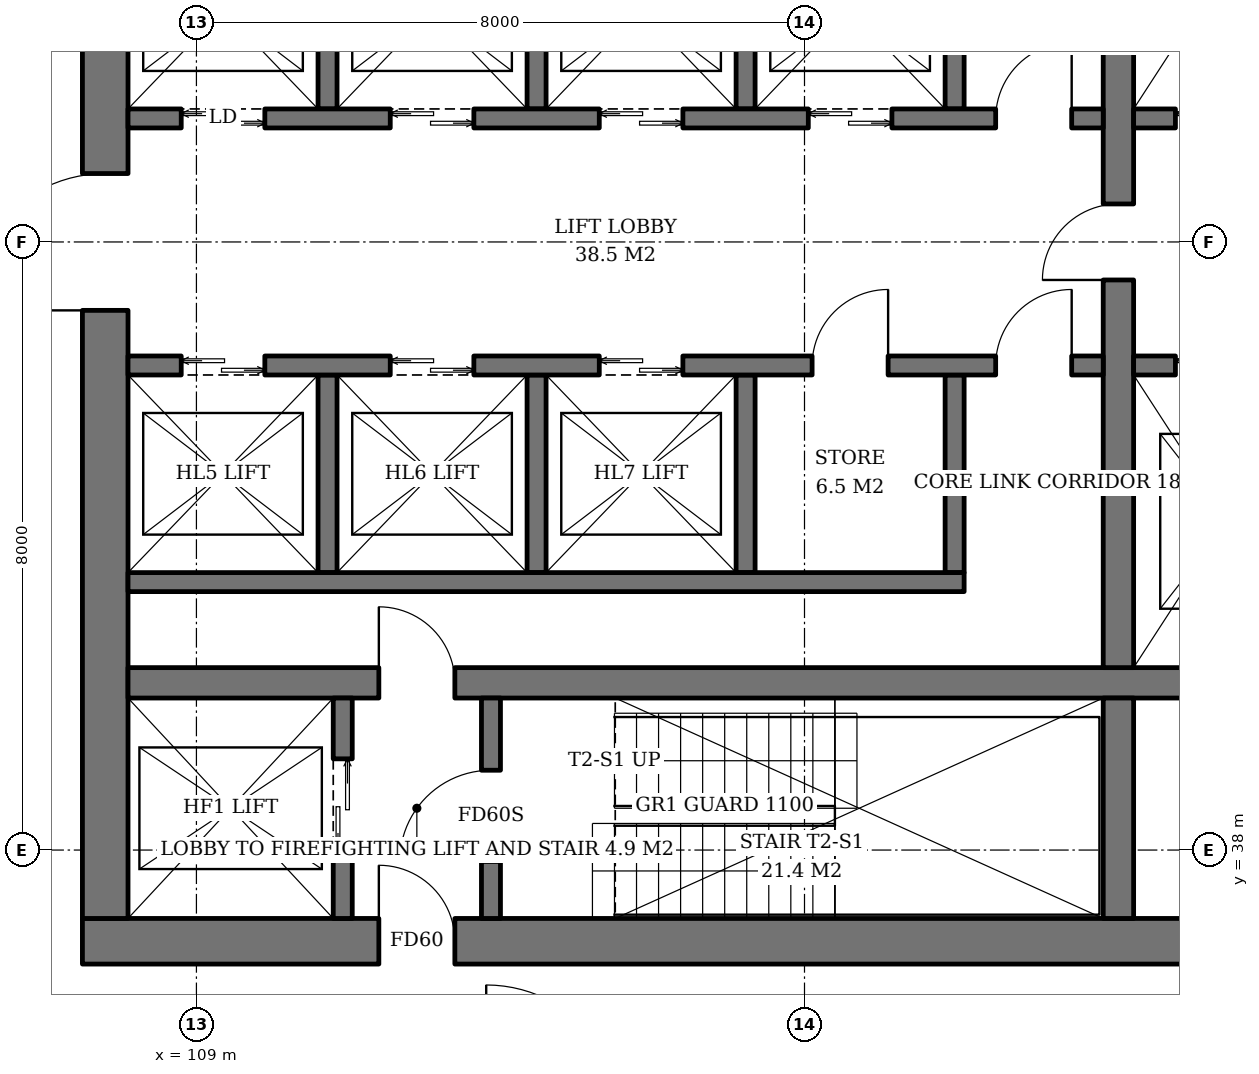
"""IFC4 building model, lengths in metres.
Left out: names, types, materials, properties, quantities, classifications, styles, units other than length and angle.
Written with IfcOpenShell. Run it as: python <this file> out.ifc"""

import sys

from ifc_helpers import new_model, si_unit, direction, frame, frame_2d, origin, place, context, subcontext, project, spatial, rectangle, extrude, element, fill, save


model = new_model("IFC4")
c1 = context("Model", 3, precision=1e-05, world=origin(), true_north=direction((0.0, 1.0)))
c2 = subcontext(c1, "Body", "Model", "MODEL_VIEW")
j1 = project(units=[si_unit("LENGTHUNIT", "METRE"), si_unit("PLANEANGLEUNIT", "RADIAN")], contexts=[c1])
p1 = place(None, origin())
s1 = spatial("IfcSite", under=j1, at=p1, CompositionType="ELEMENT")
p2 = place(p1, origin())
s2 = spatial("IfcBuilding", under=s1, at=p2, CompositionType="ELEMENT")
p3 = place(p2, frame((0.0, 0.0, 81.8)))
s3 = spatial("IfcBuildingStorey", under=s2, at=p3, CompositionType="ELEMENT", Elevation=81.8)
p4 = place(p3, frame((107.5, 36.8, 0.0), z_axis=(0.0, 0.0, 1.0), x_axis=(1.0, 0.0, 0.0)))
e1 = element("IfcWall", 1, at=p4, inside=s3, PredefinedType="SHEAR", context=c2, shape_type="SweptSolid", body=[
    extrude(rectangle(XDim=19.0, YDim=0.6, at=frame_2d((9.5, 0.0))), origin(), (0.0, 0.0, 1.0), 3.8),
])
p5 = place(p4, frame((3.9, 0.0, 0.0)))
e2 = element("IfcOpeningElement", 2, at=p5, cuts=e1, PredefinedType="OPENING", context=c2, shape_type="SweptSolid", body=[
    extrude(rectangle(XDim=1.0, YDim=2.1, at=frame_2d((0.5, 1.05))), frame((0.0, 0.31, 0.0), z_axis=(0.0, -1.0, 0.0), x_axis=(1.0, 0.0, 0.0)), (0.0, 0.0, 1.0), 0.62),
])
p6 = place(p4, frame((15.615, 0.0, 0.0)))
e3 = element("IfcOpeningElement", 3, at=p6, cuts=e1, PredefinedType="OPENING", context=c2, shape_type="SweptSolid", body=[
    extrude(rectangle(XDim=1.0, YDim=2.1, at=frame_2d((0.5, 1.05))), frame((0.0, 0.31, 0.0), z_axis=(0.0, -1.0, 0.0), x_axis=(1.0, 0.0, 0.0)), (0.0, 0.0, 1.0), 0.62),
])
p7 = place(p3, frame((107.8, 37.1, 0.0), z_axis=(0.0, 0.0, 1.0), x_axis=(0.0, 1.0, 0.0)))
e4 = element("IfcWall", 4, at=p7, inside=s3, PredefinedType="SHEAR", context=c2, shape_type="SweptSolid", body=[
    extrude(rectangle(XDim=17.8, YDim=0.6, at=frame_2d((8.9, 0.0))), origin(), (0.0, 0.0, 1.0), 3.8),
])
p8 = place(p7, frame((8.0, 0.0, 0.0)))
e5 = element("IfcOpeningElement", 5, at=p8, cuts=e4, PredefinedType="OPENING", context=c2, shape_type="SweptSolid", body=[
    extrude(rectangle(XDim=1.8, YDim=2.4, at=frame_2d((0.9, 1.2))), frame((0.0, 0.31, 0.0), z_axis=(0.0, -1.0, 0.0), x_axis=(1.0, 0.0, 0.0)), (0.0, 0.0, 1.0), 0.62),
])
p9 = place(p3, frame((108.1, 40.2, 0.0), z_axis=(0.0, 0.0, 1.0), x_axis=(1.0, 0.0, 0.0)))
e6 = element("IfcWall", 6, at=p9, inside=s3, PredefinedType="SHEAR", context=c2, shape_type="SweptSolid", body=[
    extrude(rectangle(XDim=17.8, YDim=0.4, at=frame_2d((8.9, 0.0))), origin(), (0.0, 0.0, 1.0), 3.8),
])
p10 = place(p9, frame((3.3, 0.0, 0.0)))
e7 = element("IfcOpeningElement", 7, at=p10, cuts=e6, PredefinedType="OPENING", context=c2, shape_type="SweptSolid", body=[
    extrude(rectangle(XDim=1.0, YDim=2.1, at=frame_2d((0.5, 1.05))), frame((0.0, 0.21, 0.0), z_axis=(0.0, -1.0, 0.0), x_axis=(1.0, 0.0, 0.0)), (0.0, 0.0, 1.0), 0.42),
])
p11 = place(p3, frame((121.13, 37.1, 0.0), z_axis=(0.0, 0.0, 1.0), x_axis=(0.0, 1.0, 0.0)))
e8 = element("IfcWall", 8, at=p11, inside=s3, PredefinedType="SHEAR", context=c2, shape_type="SweptSolid", body=[
    extrude(rectangle(XDim=2.9, YDim=0.4, at=frame_2d((1.45, 0.0))), origin(), (0.0, 0.0, 1.0), 3.8),
])
p12 = place(p3, frame((121.13, 40.4, 0.0), z_axis=(0.0, 0.0, 1.0), x_axis=(0.0, 1.0, 0.0)))
e9 = element("IfcWall", 9, at=p12, inside=s3, PredefinedType="SHEAR", context=c2, shape_type="SweptSolid", body=[
    extrude(rectangle(XDim=11.2, YDim=0.4, at=frame_2d((5.6, 0.0))), origin(), (0.0, 0.0, 1.0), 3.8),
])
p13 = place(p12, frame((5.1, 0.0, 0.0)))
e10 = element("IfcOpeningElement", 10, at=p13, cuts=e9, PredefinedType="OPENING", context=c2, shape_type="SweptSolid", body=[
    extrude(rectangle(XDim=1.0, YDim=2.1, at=frame_2d((0.5, 1.05))), frame((0.0, 0.21, 0.0), z_axis=(0.0, -1.0, 0.0), x_axis=(1.0, 0.0, 0.0)), (0.0, 0.0, 1.0), 0.42),
])
p14 = place(p3, frame((110.925, 37.1, 0.0), z_axis=(0.0, 0.0, 1.0), x_axis=(0.0, 1.0, 0.0)))
e11 = element("IfcWall", 11, at=p14, inside=s3, PredefinedType="SHEAR", context=c2, shape_type="SweptSolid", body=[
    extrude(rectangle(XDim=2.9, YDim=0.25, at=frame_2d((1.45, 0.0))), origin(), (0.0, 0.0, 1.0), 3.8),
])
p15 = place(p14, frame((0.8, 0.0, 0.0)))
e12 = element("IfcOpeningElement", 12, at=p15, cuts=e11, PredefinedType="OPENING", context=c2, shape_type="SweptSolid", body=[
    extrude(rectangle(XDim=1.3, YDim=2.2, at=frame_2d((0.65, 1.1))), frame((0.0, 0.135, 0.0), z_axis=(0.0, -1.0, 0.0), x_axis=(1.0, 0.0, 0.0)), (0.0, 0.0, 1.0), 0.27),
])
p16 = place(p3, frame((112.875, 37.1, 0.0), z_axis=(0.0, 0.0, 1.0), x_axis=(0.0, 1.0, 0.0)))
e13 = element("IfcWall", 13, at=p16, inside=s3, PredefinedType="SHEAR", context=c2, shape_type="SweptSolid", body=[
    extrude(rectangle(XDim=2.9, YDim=0.25, at=frame_2d((1.45, 0.0))), origin(), (0.0, 0.0, 1.0), 3.8),
])
p17 = place(p16, frame((0.75, 0.0, 0.0)))
e14 = element("IfcOpeningElement", 14, at=p17, cuts=e13, PredefinedType="OPENING", context=c2, shape_type="SweptSolid", body=[
    extrude(rectangle(XDim=1.2, YDim=2.1, at=frame_2d((0.6, 1.05))), frame((0.0, 0.135, 0.0), z_axis=(0.0, -1.0, 0.0), x_axis=(1.0, 0.0, 0.0)), (0.0, 0.0, 1.0), 0.27),
])
for number, where, z_axis, x_axis in (
    (15, (110.725, 47.75, 0.0), (0.0, 0.0, 1.0), (0.0, 1.0, 0.0)),
    (16, (113.475, 47.75, 0.0), (0.0, 0.0, 1.0), (0.0, 1.0, 0.0)),
    (17, (116.225, 47.75, 0.0), (0.0, 0.0, 1.0), (0.0, 1.0, 0.0)),
    (18, (118.975, 47.75, 0.0), (0.0, 0.0, 1.0), (0.0, 1.0, 0.0)),
):
    element("IfcWall", number, at=place(p3, frame(where, z_axis=z_axis, x_axis=x_axis)), inside=s3, PredefinedType="SHEAR", context=c2, shape_type="SweptSolid", body=[
        extrude(rectangle(XDim=2.6, YDim=0.25, at=frame_2d((1.3, 0.0))), origin(), (0.0, 0.0, 1.0), 3.8),
    ])
p18 = place(p3, frame((108.1, 47.625, 0.0), z_axis=(0.0, 0.0, 1.0), x_axis=(1.0, 0.0, 0.0)))
e19 = element("IfcWall", 19, at=p18, inside=s3, PredefinedType="SHEAR", context=c2, shape_type="SweptSolid", body=[
    extrude(rectangle(XDim=12.83, YDim=0.25, at=frame_2d((6.415, 0.0))), origin(), (0.0, 0.0, 1.0), 3.8),
])
p19 = place(p18, frame((0.7, 0.0, 0.0)))
e20 = element("IfcOpeningElement", 20, at=p19, cuts=e19, PredefinedType="OPENING", context=c2, shape_type="SweptSolid", body=[
    extrude(rectangle(XDim=1.1, YDim=2.2, at=frame_2d((0.55, 1.1))), frame((0.0, 0.135, 0.0), z_axis=(0.0, -1.0, 0.0), x_axis=(1.0, 0.0, 0.0)), (0.0, 0.0, 1.0), 0.27),
])
p20 = place(p18, frame((3.45, 0.0, 0.0)))
e21 = element("IfcOpeningElement", 21, at=p20, cuts=e19, PredefinedType="OPENING", context=c2, shape_type="SweptSolid", body=[
    extrude(rectangle(XDim=1.1, YDim=2.2, at=frame_2d((0.55, 1.1))), frame((0.0, 0.135, 0.0), z_axis=(0.0, -1.0, 0.0), x_axis=(1.0, 0.0, 0.0)), (0.0, 0.0, 1.0), 0.27),
])
p21 = place(p18, frame((6.2, 0.0, 0.0)))
e22 = element("IfcOpeningElement", 22, at=p21, cuts=e19, PredefinedType="OPENING", context=c2, shape_type="SweptSolid", body=[
    extrude(rectangle(XDim=1.1, YDim=2.2, at=frame_2d((0.55, 1.1))), frame((0.0, 0.135, 0.0), z_axis=(0.0, -1.0, 0.0), x_axis=(1.0, 0.0, 0.0)), (0.0, 0.0, 1.0), 0.27),
])
p22 = place(p18, frame((8.95, 0.0, 0.0)))
e23 = element("IfcOpeningElement", 23, at=p22, cuts=e19, PredefinedType="OPENING", context=c2, shape_type="SweptSolid", body=[
    extrude(rectangle(XDim=1.1, YDim=2.2, at=frame_2d((0.55, 1.1))), frame((0.0, 0.135, 0.0), z_axis=(0.0, -1.0, 0.0), x_axis=(1.0, 0.0, 0.0)), (0.0, 0.0, 1.0), 0.27),
])
p23 = place(p18, frame((11.415, 0.0, 0.0)))
e24 = element("IfcOpeningElement", 24, at=p23, cuts=e19, PredefinedType="OPENING", context=c2, shape_type="SweptSolid", body=[
    extrude(rectangle(XDim=1.0, YDim=2.1, at=frame_2d((0.5, 1.05))), frame((0.0, 0.135, 0.0), z_axis=(0.0, -1.0, 0.0), x_axis=(1.0, 0.0, 0.0)), (0.0, 0.0, 1.0), 0.27),
])
for number, where, z_axis, x_axis in (
    (25, (110.725, 44.25, 0.0), (0.0, 0.0, 1.0), (0.0, -1.0, 0.0)),
    (26, (113.475, 44.25, 0.0), (0.0, 0.0, 1.0), (0.0, -1.0, 0.0)),
    (27, (116.225, 44.25, 0.0), (0.0, 0.0, 1.0), (0.0, -1.0, 0.0)),
    (28, (118.975, 44.25, 0.0), (0.0, 0.0, 1.0), (0.0, -1.0, 0.0)),
):
    element("IfcWall", number, at=place(p3, frame(where, z_axis=z_axis, x_axis=x_axis)), inside=s3, PredefinedType="SHEAR", context=c2, shape_type="SweptSolid", body=[
        extrude(rectangle(XDim=2.6, YDim=0.25, at=frame_2d((1.3, 0.0))), origin(), (0.0, 0.0, 1.0), 3.8),
    ])
p24 = place(p3, frame((108.1, 41.525, 0.0), z_axis=(0.0, 0.0, 1.0), x_axis=(1.0, 0.0, 0.0)))
e29 = element("IfcWall", 29, at=p24, inside=s3, PredefinedType="SHEAR", context=c2, shape_type="SweptSolid", body=[
    extrude(rectangle(XDim=11.0, YDim=0.25, at=frame_2d((5.5, 0.0))), origin(), (0.0, 0.0, 1.0), 3.8),
])
p25 = place(p3, frame((108.1, 44.375, 0.0), z_axis=(0.0, 0.0, 1.0), x_axis=(1.0, 0.0, 0.0)))
e30 = element("IfcWall", 30, at=p25, inside=s3, PredefinedType="SHEAR", context=c2, shape_type="SweptSolid", body=[
    extrude(rectangle(XDim=12.83, YDim=0.25, at=frame_2d((6.415, 0.0))), origin(), (0.0, 0.0, 1.0), 3.8),
])
p26 = place(p25, frame((0.7, 0.0, 0.0)))
e31 = element("IfcOpeningElement", 31, at=p26, cuts=e30, PredefinedType="OPENING", context=c2, shape_type="SweptSolid", body=[
    extrude(rectangle(XDim=1.1, YDim=2.2, at=frame_2d((0.55, 1.1))), frame((0.0, 0.135, 0.0), z_axis=(0.0, -1.0, 0.0), x_axis=(1.0, 0.0, 0.0)), (0.0, 0.0, 1.0), 0.27),
])
p27 = place(p25, frame((3.45, 0.0, 0.0)))
e32 = element("IfcOpeningElement", 32, at=p27, cuts=e30, PredefinedType="OPENING", context=c2, shape_type="SweptSolid", body=[
    extrude(rectangle(XDim=1.1, YDim=2.2, at=frame_2d((0.55, 1.1))), frame((0.0, 0.135, 0.0), z_axis=(0.0, -1.0, 0.0), x_axis=(1.0, 0.0, 0.0)), (0.0, 0.0, 1.0), 0.27),
])
p28 = place(p25, frame((6.2, 0.0, 0.0)))
e33 = element("IfcOpeningElement", 33, at=p28, cuts=e30, PredefinedType="OPENING", context=c2, shape_type="SweptSolid", body=[
    extrude(rectangle(XDim=1.1, YDim=2.2, at=frame_2d((0.55, 1.1))), frame((0.0, 0.135, 0.0), z_axis=(0.0, -1.0, 0.0), x_axis=(1.0, 0.0, 0.0)), (0.0, 0.0, 1.0), 0.27),
])
p29 = place(p25, frame((9.0, 0.0, 0.0)))
e34 = element("IfcOpeningElement", 34, at=p29, cuts=e30, PredefinedType="OPENING", context=c2, shape_type="SweptSolid", body=[
    extrude(rectangle(XDim=1.0, YDim=2.1, at=frame_2d((0.5, 1.05))), frame((0.0, 0.135, 0.0), z_axis=(0.0, -1.0, 0.0), x_axis=(1.0, 0.0, 0.0)), (0.0, 0.0, 1.0), 0.27),
])
p30 = place(p25, frame((11.415, 0.0, 0.0)))
e35 = element("IfcOpeningElement", 35, at=p30, cuts=e30, PredefinedType="OPENING", context=c2, shape_type="SweptSolid", body=[
    extrude(rectangle(XDim=1.0, YDim=2.1, at=frame_2d((0.5, 1.05))), frame((0.0, 0.135, 0.0), z_axis=(0.0, -1.0, 0.0), x_axis=(1.0, 0.0, 0.0)), (0.0, 0.0, 1.0), 0.27),
])
p31 = place(p3, frame((121.33, 47.625, 0.0), z_axis=(0.0, 0.0, 1.0), x_axis=(1.0, 0.0, 0.0)))
e36 = element("IfcWall", 36, at=p31, inside=s3, PredefinedType="SHEAR", context=c2, shape_type="SweptSolid", body=[
    extrude(rectangle(XDim=4.57, YDim=0.25, at=frame_2d((2.285, 0.0))), origin(), (0.0, 0.0, 1.0), 3.8),
])
p32 = place(p31, frame((0.55, 0.0, 0.0)))
e37 = element("IfcOpeningElement", 37, at=p32, cuts=e36, PredefinedType="OPENING", context=c2, shape_type="SweptSolid", body=[
    extrude(rectangle(XDim=1.4, YDim=2.4, at=frame_2d((0.7, 1.2))), frame((0.0, 0.135, 0.0), z_axis=(0.0, -1.0, 0.0), x_axis=(1.0, 0.0, 0.0)), (0.0, 0.0, 1.0), 0.27),
])
p33 = place(p31, frame((3.26, 0.0, 0.0)))
e38 = element("IfcOpeningElement", 38, at=p33, cuts=e36, PredefinedType="OPENING", context=c2, shape_type="SweptSolid", body=[
    extrude(rectangle(XDim=0.8, YDim=2.0, at=frame_2d((0.4, 1.0))), frame((0.0, 0.135, 0.0), z_axis=(0.0, -1.0, 0.0), x_axis=(1.0, 0.0, 0.0)), (0.0, 0.0, 1.0), 0.27),
])
p34 = place(p3, frame((121.33, 44.375, 0.0), z_axis=(0.0, 0.0, 1.0), x_axis=(1.0, 0.0, 0.0)))
e39 = element("IfcWall", 39, at=p34, inside=s3, PredefinedType="SHEAR", context=c2, shape_type="SweptSolid", body=[
    extrude(rectangle(XDim=4.57, YDim=0.25, at=frame_2d((2.285, 0.0))), origin(), (0.0, 0.0, 1.0), 3.8),
])
p35 = place(p34, frame((0.55, 0.0, 0.0)))
e40 = element("IfcOpeningElement", 40, at=p35, cuts=e39, PredefinedType="OPENING", context=c2, shape_type="SweptSolid", body=[
    extrude(rectangle(XDim=1.4, YDim=2.4, at=frame_2d((0.7, 1.2))), frame((0.0, 0.135, 0.0), z_axis=(0.0, -1.0, 0.0), x_axis=(1.0, 0.0, 0.0)), (0.0, 0.0, 1.0), 0.27),
])
p36 = place(p34, frame((3.26, 0.0, 0.0)))
e41 = element("IfcOpeningElement", 41, at=p36, cuts=e39, PredefinedType="OPENING", context=c2, shape_type="SweptSolid", body=[
    extrude(rectangle(XDim=0.8, YDim=2.0, at=frame_2d((0.4, 1.0))), frame((0.0, 0.135, 0.0), z_axis=(0.0, -1.0, 0.0), x_axis=(1.0, 0.0, 0.0)), (0.0, 0.0, 1.0), 0.27),
])
p37 = place(p15, origin())
e42 = element("IfcDoor", 42, at=p37, inside=s3, OperationType="DOUBLE_DOOR_SLIDING", PredefinedType="DOOR", context=c2, shape_type="SweptSolid", body=[
    extrude(rectangle(XDim=1.3, YDim=2.2, at=frame_2d((0.65, 1.1))), frame((0.0, 0.025, 0.0), z_axis=(0.0, -1.0, 0.0), x_axis=(1.0, 0.0, 0.0)), (0.0, 0.0, 1.0), 0.05),
])
fill(e12, e42)
p38 = place(p17, origin())
e43 = element("IfcDoor", 43, at=p38, inside=s3, OperationType="SINGLE_SWING_LEFT", PredefinedType="DOOR", context=c2, shape_type="SweptSolid", body=[
    extrude(rectangle(XDim=1.2, YDim=2.1, at=frame_2d((0.6, 1.05))), frame((0.0, 0.025, 0.0), z_axis=(0.0, -1.0, 0.0), x_axis=(1.0, 0.0, 0.0)), (0.0, 0.0, 1.0), 0.05),
])
fill(e14, e43)
p39 = place(p19, origin())
e44 = element("IfcDoor", 44, at=p39, inside=s3, OperationType="DOUBLE_DOOR_SLIDING", PredefinedType="DOOR", context=c2, shape_type="SweptSolid", body=[
    extrude(rectangle(XDim=1.1, YDim=2.2, at=frame_2d((0.55, 1.1))), frame((0.0, 0.025, 0.0), z_axis=(0.0, -1.0, 0.0), x_axis=(1.0, 0.0, 0.0)), (0.0, 0.0, 1.0), 0.05),
])
fill(e20, e44)
p40 = place(p20, origin())
e45 = element("IfcDoor", 45, at=p40, inside=s3, OperationType="DOUBLE_DOOR_SLIDING", PredefinedType="DOOR", context=c2, shape_type="SweptSolid", body=[
    extrude(rectangle(XDim=1.1, YDim=2.2, at=frame_2d((0.55, 1.1))), frame((0.0, 0.025, 0.0), z_axis=(0.0, -1.0, 0.0), x_axis=(1.0, 0.0, 0.0)), (0.0, 0.0, 1.0), 0.05),
])
fill(e21, e45)
p41 = place(p21, origin())
e46 = element("IfcDoor", 46, at=p41, inside=s3, OperationType="DOUBLE_DOOR_SLIDING", PredefinedType="DOOR", context=c2, shape_type="SweptSolid", body=[
    extrude(rectangle(XDim=1.1, YDim=2.2, at=frame_2d((0.55, 1.1))), frame((0.0, 0.025, 0.0), z_axis=(0.0, -1.0, 0.0), x_axis=(1.0, 0.0, 0.0)), (0.0, 0.0, 1.0), 0.05),
])
fill(e22, e46)
p42 = place(p22, origin())
e47 = element("IfcDoor", 47, at=p42, inside=s3, OperationType="DOUBLE_DOOR_SLIDING", PredefinedType="DOOR", context=c2, shape_type="SweptSolid", body=[
    extrude(rectangle(XDim=1.1, YDim=2.2, at=frame_2d((0.55, 1.1))), frame((0.0, 0.025, 0.0), z_axis=(0.0, -1.0, 0.0), x_axis=(1.0, 0.0, 0.0)), (0.0, 0.0, 1.0), 0.05),
])
fill(e23, e47)
p43 = place(p23, origin())
e48 = element("IfcDoor", 48, at=p43, inside=s3, OperationType="SINGLE_SWING_RIGHT", PredefinedType="DOOR", context=c2, shape_type="SweptSolid", body=[
    extrude(rectangle(XDim=1.0, YDim=2.1, at=frame_2d((0.5, 1.05))), frame((0.0, 0.025, 0.0), z_axis=(0.0, -1.0, 0.0), x_axis=(1.0, 0.0, 0.0)), (0.0, 0.0, 1.0), 0.05),
])
fill(e24, e48)
p44 = place(p26, origin())
e49 = element("IfcDoor", 49, at=p44, inside=s3, OperationType="DOUBLE_DOOR_SLIDING", PredefinedType="DOOR", context=c2, shape_type="SweptSolid", body=[
    extrude(rectangle(XDim=1.1, YDim=2.2, at=frame_2d((0.55, 1.1))), frame((0.0, 0.025, 0.0), z_axis=(0.0, -1.0, 0.0), x_axis=(1.0, 0.0, 0.0)), (0.0, 0.0, 1.0), 0.05),
])
fill(e31, e49)
p45 = place(p27, origin())
e50 = element("IfcDoor", 50, at=p45, inside=s3, OperationType="DOUBLE_DOOR_SLIDING", PredefinedType="DOOR", context=c2, shape_type="SweptSolid", body=[
    extrude(rectangle(XDim=1.1, YDim=2.2, at=frame_2d((0.55, 1.1))), frame((0.0, 0.025, 0.0), z_axis=(0.0, -1.0, 0.0), x_axis=(1.0, 0.0, 0.0)), (0.0, 0.0, 1.0), 0.05),
])
fill(e32, e50)
p46 = place(p28, origin())
e51 = element("IfcDoor", 51, at=p46, inside=s3, OperationType="DOUBLE_DOOR_SLIDING", PredefinedType="DOOR", context=c2, shape_type="SweptSolid", body=[
    extrude(rectangle(XDim=1.1, YDim=2.2, at=frame_2d((0.55, 1.1))), frame((0.0, 0.025, 0.0), z_axis=(0.0, -1.0, 0.0), x_axis=(1.0, 0.0, 0.0)), (0.0, 0.0, 1.0), 0.05),
])
fill(e33, e51)
p47 = place(p29, origin())
e52 = element("IfcDoor", 52, at=p47, inside=s3, OperationType="SINGLE_SWING_RIGHT", PredefinedType="DOOR", context=c2, shape_type="SweptSolid", body=[
    extrude(rectangle(XDim=1.0, YDim=2.1, at=frame_2d((0.5, 1.05))), frame((0.0, 0.025, 0.0), z_axis=(0.0, -1.0, 0.0), x_axis=(1.0, 0.0, 0.0)), (0.0, 0.0, 1.0), 0.05),
])
fill(e34, e52)
p48 = place(p30, origin())
e53 = element("IfcDoor", 53, at=p48, inside=s3, OperationType="SINGLE_SWING_RIGHT", PredefinedType="DOOR", context=c2, shape_type="SweptSolid", body=[
    extrude(rectangle(XDim=1.0, YDim=2.1, at=frame_2d((0.5, 1.05))), frame((0.0, 0.025, 0.0), z_axis=(0.0, -1.0, 0.0), x_axis=(1.0, 0.0, 0.0)), (0.0, 0.0, 1.0), 0.05),
])
fill(e35, e53)
p49 = place(p32, origin())
e54 = element("IfcDoor", 54, at=p49, inside=s3, OperationType="DOUBLE_DOOR_SLIDING", PredefinedType="DOOR", context=c2, shape_type="SweptSolid", body=[
    extrude(rectangle(XDim=1.4, YDim=2.4, at=frame_2d((0.7, 1.2))), frame((0.0, 0.025, 0.0), z_axis=(0.0, -1.0, 0.0), x_axis=(1.0, 0.0, 0.0)), (0.0, 0.0, 1.0), 0.05),
])
fill(e37, e54)
p50 = place(p35, origin())
e55 = element("IfcDoor", 55, at=p50, inside=s3, OperationType="DOUBLE_DOOR_SLIDING", PredefinedType="DOOR", context=c2, shape_type="SweptSolid", body=[
    extrude(rectangle(XDim=1.4, YDim=2.4, at=frame_2d((0.7, 1.2))), frame((0.0, 0.025, 0.0), z_axis=(0.0, -1.0, 0.0), x_axis=(1.0, 0.0, 0.0)), (0.0, 0.0, 1.0), 0.05),
])
fill(e40, e55)
p51 = place(p13, origin())
e56 = element("IfcDoor", 56, at=p51, inside=s3, OperationType="SINGLE_SWING_LEFT", PredefinedType="DOOR", context=c2, shape_type="SweptSolid", body=[
    extrude(rectangle(XDim=1.0, YDim=2.1, at=frame_2d((0.5, 1.05))), frame((0.0, 0.025, 0.0), z_axis=(0.0, -1.0, 0.0), x_axis=(1.0, 0.0, 0.0)), (0.0, 0.0, 1.0), 0.05),
])
fill(e10, e56)
p52 = place(p5, origin())
e57 = element("IfcDoor", 57, at=p52, inside=s3, OperationType="SINGLE_SWING_LEFT", PredefinedType="DOOR", context=c2, shape_type="SweptSolid", body=[
    extrude(rectangle(XDim=1.0, YDim=2.1, at=frame_2d((0.5, 1.05))), frame((0.0, 0.025, 0.0), z_axis=(0.0, -1.0, 0.0), x_axis=(1.0, 0.0, 0.0)), (0.0, 0.0, 1.0), 0.05),
])
fill(e2, e57)
p53 = place(p8, origin())
e58 = element("IfcDoor", 58, at=p53, inside=s3, OperationType="DOUBLE_DOOR_SINGLE_SWING", PredefinedType="DOOR", context=c2, shape_type="SweptSolid", body=[
    extrude(rectangle(XDim=1.8, YDim=2.4, at=frame_2d((0.9, 1.2))), frame((0.0, 0.025, 0.0), z_axis=(0.0, -1.0, 0.0), x_axis=(1.0, 0.0, 0.0)), (0.0, 0.0, 1.0), 0.05),
])
fill(e5, e58)
p54 = place(p10, origin())
e59 = element("IfcDoor", 59, at=p54, inside=s3, OperationType="SINGLE_SWING_LEFT", PredefinedType="DOOR", context=c2, shape_type="SweptSolid", body=[
    extrude(rectangle(XDim=1.0, YDim=2.1, at=frame_2d((0.5, 1.05))), frame((0.0, 0.025, 0.0), z_axis=(0.0, -1.0, 0.0), x_axis=(1.0, 0.0, 0.0)), (0.0, 0.0, 1.0), 0.05),
])
fill(e7, e59)
save(model, sys.argv[1])
